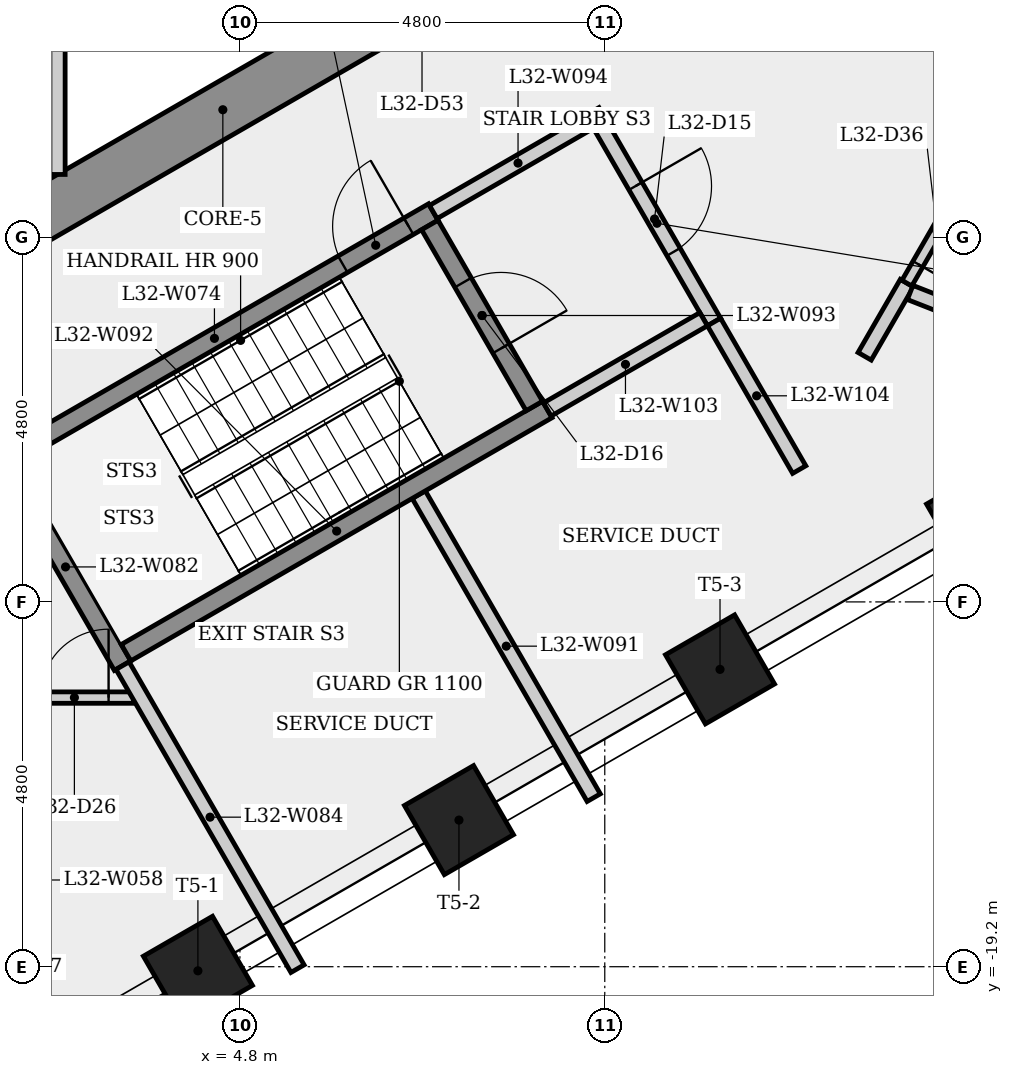
"""IFC4 building model, lengths in metres.
Left out: names, types, materials, properties, quantities, classifications, styles, units other than length and angle.
Written with IfcOpenShell. Run it as: python <this file> out.ifc"""

import sys

from ifc_helpers import new_model, si_unit, direction, frame, frame_2d, origin, origin_2d, place, context, subcontext, project, spatial, rectangle, extrude, element, fill, save


model = new_model("IFC4")
c1 = context("Model", 3, precision=1e-05, world=origin(), true_north=direction((0.0, 1.0)))
c2 = subcontext(c1, "Body", "Model", "MODEL_VIEW")
j1 = project(units=[si_unit("LENGTHUNIT", "METRE"), si_unit("PLANEANGLEUNIT", "RADIAN")], contexts=[c1])
p1 = place(None, origin())
s1 = spatial("IfcSite", under=j1, at=p1, CompositionType="ELEMENT")
p2 = place(p1, origin())
s2 = spatial("IfcBuilding", under=s1, at=p2, CompositionType="ELEMENT")
p3 = place(p2, frame((0.0, 0.0, 120.5)))
s3 = spatial("IfcBuildingStorey", under=s2, at=p3, CompositionType="ELEMENT", Elevation=120.5)
p4 = place(p3, frame((-0.175, -10.667, 0.0), z_axis=(0.0, 0.0, 1.0), x_axis=(0.866023993627, 0.500002442456, 0.0)))
e1 = element("IfcWall", 1, at=p4, inside=s3, PredefinedType="SHEAR", context=c2, shape_type="SweptSolid", body=[
    extrude(rectangle(XDim=10.97, YDim=0.7, at=frame_2d((5.485, 0.0))), origin(), (0.0, 0.0, 1.0), 4.0),
])
p5 = place(p4, frame((1.34, 0.0, 0.0)))
e2 = element("IfcOpeningElement", 2, at=p5, cuts=e1, PredefinedType="OPENING", context=c2, shape_type="SweptSolid", body=[
    extrude(rectangle(XDim=0.9, YDim=2.1, at=frame_2d((0.45, 1.05))), frame((0.0, 0.36, 0.0), z_axis=(0.0, -1.0, 0.0), x_axis=(1.0, 0.0, 0.0)), (0.0, 0.0, 1.0), 0.72),
])
p6 = place(p4, frame((8.061, 0.0, 0.0)))
e3 = element("IfcOpeningElement", 3, at=p6, cuts=e1, PredefinedType="OPENING", context=c2, shape_type="SweptSolid", body=[
    extrude(rectangle(XDim=0.9, YDim=2.1, at=frame_2d((0.45, 1.05))), frame((0.0, 0.36, 0.0), z_axis=(0.0, -1.0, 0.0), x_axis=(1.0, 0.0, 0.0)), (0.0, 0.0, 1.0), 0.72),
])
for number, where, z_axis, x_axis in (
    (4, (4.247, -19.254, 0.0), (0.0, 0.0, 1.0), (0.5, -0.866, 0.0)),
    (5, (7.682, -17.271, 0.0), (0.0, 0.0, 1.0), (0.5, -0.866, 0.0)),
    (6, (11.116, -15.288, 0.0), (0.0, 0.0, 1.0), (0.5, -0.866, 0.0)),
    (7, (14.551, -13.305, 0.0), (0.0, 0.0, 1.0), (0.5, -0.866, 0.0)),
):
    element("IfcColumn", number, at=place(p3, frame(where, z_axis=z_axis, x_axis=x_axis)), inside=s3, PredefinedType="COLUMN", context=c2, shape_type="SweptSolid", body=[
        extrude(rectangle(XDim=1.05, YDim=1.05, at=origin_2d()), origin(), (0.0, 0.0, 1.0), 4.0),
    ])
p7 = place(p3, frame((1.585, -12.595, 0.0), z_axis=(0.0, 0.0, 1.0), x_axis=(0.866036417653, 0.499980922934, 0.0)))
e8 = element("IfcWall", 8, at=p7, inside=s3, PredefinedType="SHEAR", context=c2, shape_type="SweptSolid", body=[
    extrude(rectangle(XDim=6.65, YDim=0.25, at=frame_2d((3.325, 0.0))), origin(), (0.0, 0.0, 1.0), 3.6),
])
p8 = place(p7, frame((5.275, 0.0, 0.0)))
e9 = element("IfcOpeningElement", 9, at=p8, cuts=e8, PredefinedType="OPENING", context=c2, shape_type="SweptSolid", body=[
    extrude(rectangle(XDim=1.0, YDim=2.1, at=frame_2d((0.5, 1.05))), frame((0.0, 0.135, 0.0), z_axis=(0.0, -1.0, 0.0), x_axis=(1.0, 0.0, 0.0)), (0.0, 0.0, 1.0), 0.27),
])
p9 = place(p3, frame((-0.602, -15.659, 0.0), z_axis=(0.0, 0.0, 1.0), x_axis=(1.0, 0.0, 0.0)))
e10 = element("IfcWall", 10, at=p9, inside=s3, PredefinedType="PARTITIONING", context=c2, shape_type="SweptSolid", body=[
    extrude(rectangle(XDim=4.0, YDim=0.15, at=frame_2d((2.0, 0.0))), origin(), (0.0, 0.0, 1.0), 3.6),
])
p10 = place(p9, frame((2.774, 0.0, 0.0)))
e11 = element("IfcOpeningElement", 11, at=p10, cuts=e10, PredefinedType="OPENING", context=c2, shape_type="SweptSolid", body=[
    extrude(rectangle(XDim=0.9, YDim=2.1, at=frame_2d((0.45, 1.05))), frame((0.0, 0.085, 0.0), z_axis=(0.0, -1.0, 0.0), x_axis=(1.0, 0.0, 0.0)), (0.0, 0.0, 1.0), 0.17),
])
p11 = place(p3, frame((2.4, -5.275, 0.0), z_axis=(0.0, 0.0, 1.0), x_axis=(0.0, -1.0, 0.0)))
e12 = element("IfcWall", 12, at=p11, inside=s3, PredefinedType="PARTITIONING", context=c2, shape_type="SweptSolid", body=[
    extrude(rectangle(XDim=3.501, YDim=0.2, at=frame_2d((1.75, 0.0))), origin(), (0.0, 0.0, 1.0), 3.6),
])
p12 = place(p3, frame((3.256, -15.239, 0.0), z_axis=(0.0, 0.0, 1.0), x_axis=(-0.50002537861, 0.866010750942, 0.0)))
e13 = element("IfcWall", 13, at=p12, inside=s3, PredefinedType="SHEAR", context=c2, shape_type="SweptSolid", body=[
    extrude(rectangle(XDim=3.0, YDim=0.25, at=frame_2d((1.5, 0.0))), origin(), (0.0, 0.0, 1.0), 3.6),
])
for number, where, z_axis, x_axis in (
    (14, (3.256, -15.239, 0.0), (0.0, 0.0, 1.0), (0.5, -0.866, 0.0)),
    (15, (7.153, -12.989, 0.0), (0.0, 0.0, 1.0), (0.5, -0.866, 0.0)),
):
    element("IfcWall", number, at=place(p3, frame(where, z_axis=z_axis, x_axis=x_axis)), inside=s3, PredefinedType="PLUMBINGWALL", context=c2, shape_type="SweptSolid", body=[
        extrude(rectangle(XDim=4.604, YDim=0.2, at=frame_2d((2.302, 0.0))), origin(), (0.0, 0.0, 1.0), 3.6),
    ])
p13 = place(p3, frame((3.301, -15.068, 0.0), z_axis=(0.0, 0.0, 1.0), x_axis=(0.866035036182, 0.499983315828, 0.0)))
e16 = element("IfcWall", 16, at=p13, inside=s3, PredefinedType="SHEAR", context=c2, shape_type="SweptSolid", body=[
    extrude(rectangle(XDim=6.4, YDim=0.25, at=frame_2d((3.2, 0.0))), origin(), (0.0, 0.0, 1.0), 4.0),
])
p14 = place(p3, frame((7.298, -9.441, 0.0), z_axis=(0.0, 0.0, 1.0), x_axis=(0.500034990121, -0.866005201286, 0.0)))
e17 = element("IfcWall", 17, at=p14, inside=s3, PredefinedType="SHEAR", context=c2, shape_type="SweptSolid", body=[
    extrude(rectangle(XDim=2.75, YDim=0.25, at=frame_2d((1.375, 0.0))), origin(), (0.0, 0.0, 1.0), 3.6),
])
p15 = place(p14, frame((0.875, 0.0, 0.0)))
e18 = element("IfcOpeningElement", 18, at=p15, cuts=e17, PredefinedType="OPENING", context=c2, shape_type="SweptSolid", body=[
    extrude(rectangle(XDim=1.0, YDim=2.1, at=frame_2d((0.5, 1.05))), frame((0.0, 0.135, 0.0), z_axis=(0.0, -1.0, 0.0), x_axis=(1.0, 0.0, 0.0)), (0.0, 0.0, 1.0), 0.27),
])
p16 = place(p3, frame((7.344, -9.27, 0.0), z_axis=(0.0, 0.0, 1.0), x_axis=(0.866005588531, 0.500034319456, 0.0)))
e19 = element("IfcWall", 19, at=p16, inside=s3, PredefinedType="PARTITIONING", context=c2, shape_type="SweptSolid", body=[
    extrude(rectangle(XDim=2.575, YDim=0.2, at=frame_2d((1.288, 0.0))), origin(), (0.0, 0.0, 1.0), 3.6),
])
p17 = place(p3, frame((9.537, -8.119, 0.0), z_axis=(0.0, 0.0, 1.0), x_axis=(0.499990139034, -0.866031096941, 0.0)))
e20 = element("IfcWall", 20, at=p17, inside=s3, PredefinedType="PARTITIONING", context=c2, shape_type="SweptSolid", body=[
    extrude(rectangle(XDim=3.0, YDim=0.2, at=frame_2d((1.5, 0.0))), origin(), (0.0, 0.0, 1.0), 3.6),
])
p18 = place(p17, frame((0.935, 0.0, 0.0)))
e21 = element("IfcOpeningElement", 21, at=p18, cuts=e20, PredefinedType="OPENING", context=c2, shape_type="SweptSolid", body=[
    extrude(rectangle(XDim=1.0, YDim=2.1, at=frame_2d((0.5, 1.05))), frame((0.0, 0.11, 0.0), z_axis=(0.0, -1.0, 0.0), x_axis=(1.0, 0.0, 0.0)), (0.0, 0.0, 1.0), 0.22),
])
p19 = place(p3, frame((10.901, -10.681, 0.0), z_axis=(0.0, 0.0, 1.0), x_axis=(-0.866007538022, -0.500030943131, 0.0)))
e22 = element("IfcWall", 22, at=p19, inside=s3, PredefinedType="PLUMBINGWALL", context=c2, shape_type="SweptSolid", body=[
    extrude(rectangle(XDim=2.375, YDim=0.2, at=frame_2d((1.188, 0.0))), origin(), (0.0, 0.0, 1.0), 3.6),
])
p20 = place(p3, frame((11.037, -10.717, 0.0), z_axis=(0.0, 0.0, 1.0), x_axis=(0.499980071345, -0.866036909293, 0.0)))
e23 = element("IfcWall", 23, at=p20, inside=s3, PredefinedType="PLUMBINGWALL", context=c2, shape_type="SweptSolid", body=[
    extrude(rectangle(XDim=2.242, YDim=0.2, at=frame_2d((1.121, 0.0))), origin(), (0.0, 0.0, 1.0), 3.6),
])
p21 = place(p3, frame((13.575, -10.206, 0.0), z_axis=(0.0, 0.0, 1.0), x_axis=(-0.49991892933, -0.866072204898, 0.0)))
e24 = element("IfcWall", 24, at=p21, inside=s3, PredefinedType="PLUMBINGWALL", context=c2, shape_type="SweptSolid", body=[
    extrude(rectangle(XDim=1.112, YDim=0.2, at=frame_2d((0.556, 0.0))), origin(), (0.0, 0.0, 1.0), 3.6),
])
p22 = place(p3, frame((14.365, -8.836, 0.0), z_axis=(0.0, 0.0, 1.0), x_axis=(-0.499958581471, -0.866049315463, 0.0)))
e25 = element("IfcWall", 25, at=p22, inside=s3, PredefinedType="PARTITIONING", context=c2, shape_type="SweptSolid", body=[
    extrude(rectangle(XDim=1.581, YDim=0.15, at=frame_2d((0.791, 0.0))), origin(), (0.0, 0.0, 1.0), 3.6),
])
p23 = place(p22, frame((0.291, 0.0, 0.0)))
e26 = element("IfcOpeningElement", 26, at=p23, cuts=e25, PredefinedType="OPENING", context=c2, shape_type="SweptSolid", body=[
    extrude(rectangle(XDim=1.0, YDim=2.1, at=frame_2d((0.5, 1.05))), frame((0.0, 0.085, 0.0), z_axis=(0.0, -1.0, 0.0), x_axis=(1.0, 0.0, 0.0)), (0.0, 0.0, 1.0), 0.17),
])
p24 = place(p3, frame((17.105, -11.697, 0.0), z_axis=(0.0, 0.0, 1.0), x_axis=(-0.930905866209, 0.365259179566, 0.0)))
e27 = element("IfcWall", 27, at=p24, inside=s3, PredefinedType="PLUMBINGWALL", context=c2, shape_type="SweptSolid", body=[
    extrude(rectangle(XDim=3.746, YDim=0.2, at=frame_2d((1.873, 0.0))), origin(), (0.0, 0.0, 1.0), 3.6),
])
p25 = place(p8, origin())
e28 = element("IfcDoor", 28, at=p25, inside=s3, OperationType="SINGLE_SWING_RIGHT", PredefinedType="DOOR", context=c2, shape_type="SweptSolid", body=[
    extrude(rectangle(XDim=1.0, YDim=2.1, at=frame_2d((0.5, 1.05))), frame((0.0, 0.025, 0.0), z_axis=(0.0, -1.0, 0.0), x_axis=(1.0, 0.0, 0.0)), (0.0, 0.0, 1.0), 0.05),
])
fill(e9, e28)
p26 = place(p18, origin())
e29 = element("IfcDoor", 29, at=p26, inside=s3, OperationType="SINGLE_SWING_LEFT", PredefinedType="DOOR", context=c2, shape_type="SweptSolid", body=[
    extrude(rectangle(XDim=1.0, YDim=2.1, at=frame_2d((0.5, 1.05))), frame((0.0, 0.025, 0.0), z_axis=(0.0, -1.0, 0.0), x_axis=(1.0, 0.0, 0.0)), (0.0, 0.0, 1.0), 0.05),
])
fill(e21, e29)
p27 = place(p15, origin())
e30 = element("IfcDoor", 30, at=p27, inside=s3, OperationType="SINGLE_SWING_RIGHT", PredefinedType="DOOR", context=c2, shape_type="SweptSolid", body=[
    extrude(rectangle(XDim=1.0, YDim=2.1, at=frame_2d((0.5, 1.05))), frame((0.0, 0.025, 0.0), z_axis=(0.0, -1.0, 0.0), x_axis=(1.0, 0.0, 0.0)), (0.0, 0.0, 1.0), 0.05),
])
fill(e18, e30)
p28 = place(p10, origin())
e31 = element("IfcDoor", 31, at=p28, inside=s3, OperationType="SINGLE_SWING_RIGHT", PredefinedType="DOOR", context=c2, shape_type="SweptSolid", body=[
    extrude(rectangle(XDim=0.9, YDim=2.1, at=frame_2d((0.45, 1.05))), frame((0.0, 0.025, 0.0), z_axis=(0.0, -1.0, 0.0), x_axis=(1.0, 0.0, 0.0)), (0.0, 0.0, 1.0), 0.05),
])
fill(e11, e31)
p29 = place(p23, origin())
e32 = element("IfcDoor", 32, at=p29, inside=s3, OperationType="SINGLE_SWING_RIGHT", PredefinedType="DOOR", context=c2, shape_type="SweptSolid", body=[
    extrude(rectangle(XDim=1.0, YDim=2.1, at=frame_2d((0.5, 1.05))), frame((0.0, 0.025, 0.0), z_axis=(0.0, -1.0, 0.0), x_axis=(1.0, 0.0, 0.0)), (0.0, 0.0, 1.0), 0.05),
])
fill(e26, e32)
save(model, sys.argv[1])
